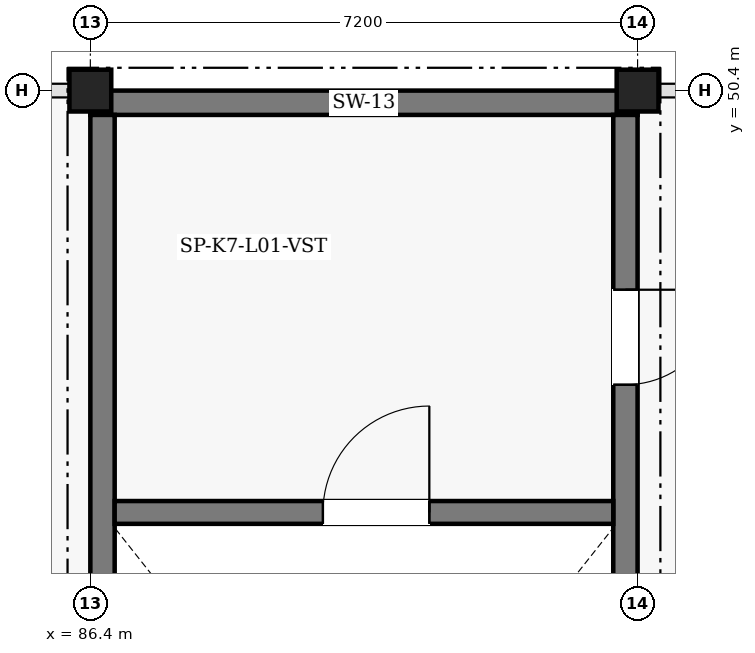
"""IFC4 building model, lengths in metres.
Left out: names, types, materials, properties, quantities, classifications, styles, units other than length and angle.
Written with IfcOpenShell. Run it as: python <this file> out.ifc"""

import sys

from ifc_helpers import new_model, si_unit, direction, frame, frame_2d, origin, origin_2d, place, context, subcontext, project, spatial, rectangle, extrude, element, fill, save


model = new_model("IFC4")
c1 = context("Model", 3, precision=1e-05, world=origin(), true_north=direction((0.0, 1.0)))
c2 = subcontext(c1, "Body", "Model", "MODEL_VIEW")
j1 = project(units=[si_unit("LENGTHUNIT", "METRE"), si_unit("PLANEANGLEUNIT", "RADIAN")], contexts=[c1])
p1 = place(None, origin())
s1 = spatial("IfcSite", under=j1, at=p1, CompositionType="ELEMENT")
p2 = place(p1, origin())
s2 = spatial("IfcBuilding", under=s1, at=p2, CompositionType="ELEMENT")
p3 = place(p2, frame((0.0, 0.0, 5.4)))
s3 = spatial("IfcBuildingStorey", under=s2, at=p3, CompositionType="ELEMENT", Elevation=5.4)
p4 = place(p3, frame((86.4, 50.24, 0.0), z_axis=(0.0, 0.0, 1.0), x_axis=(1.0, 0.0, 0.0)))
e1 = element("IfcWall", 1, at=p4, inside=s3, PredefinedType="SHEAR", context=c2, shape_type="SweptSolid", body=[
    extrude(rectangle(XDim=7.2, YDim=0.32, at=frame_2d((3.6, 0.0))), origin(), (0.0, 0.0, 1.0), 4.2),
])
p5 = place(p3, frame((93.44, 50.08, 0.0), z_axis=(0.0, 0.0, 1.0), x_axis=(0.0, -1.0, 0.0)))
e2 = element("IfcWall", 2, at=p5, inside=s3, PredefinedType="SHEAR", context=c2, shape_type="SweptSolid", body=[
    extrude(rectangle(XDim=13.76, YDim=0.32, at=frame_2d((6.88, 0.0))), origin(), (0.0, 0.0, 1.0), 4.2),
])
p6 = place(p5, frame((2.3, 0.0, 0.0)))
e3 = element("IfcOpeningElement", 3, at=p6, cuts=e2, PredefinedType="OPENING", context=c2, shape_type="SweptSolid", body=[
    extrude(rectangle(XDim=1.25, YDim=2.2, at=frame_2d((0.625, 1.1))), frame((0.0, 0.17, 0.0), z_axis=(0.0, -1.0, 0.0), x_axis=(1.0, 0.0, 0.0)), (0.0, 0.0, 1.0), 0.34),
])
p7 = place(p3, frame((86.56, 36.32, 0.0), z_axis=(0.0, 0.0, 1.0), x_axis=(0.0, 1.0, 0.0)))
e4 = element("IfcWall", 4, at=p7, inside=s3, PredefinedType="SHEAR", context=c2, shape_type="SweptSolid", body=[
    extrude(rectangle(XDim=13.76, YDim=0.32, at=frame_2d((6.88, 0.0))), origin(), (0.0, 0.0, 1.0), 4.2),
])
p8 = place(p3, frame((86.72, 44.85, 0.0), z_axis=(0.0, 0.0, 1.0), x_axis=(1.0, 0.0, 0.0)))
e5 = element("IfcWall", 5, at=p8, inside=s3, PredefinedType="SHEAR", context=c2, shape_type="SweptSolid", body=[
    extrude(rectangle(XDim=6.56, YDim=0.3, at=frame_2d((3.28, 0.0))), origin(), (0.0, 0.0, 1.0), 4.2),
])
p9 = place(p8, frame((2.74, 0.0, 0.0)))
e6 = element("IfcOpeningElement", 6, at=p9, cuts=e5, PredefinedType="OPENING", context=c2, shape_type="SweptSolid", body=[
    extrude(rectangle(XDim=1.4, YDim=2.2, at=frame_2d((0.7, 1.1))), frame((0.0, 0.16, 0.0), z_axis=(0.0, -1.0, 0.0), x_axis=(1.0, 0.0, 0.0)), (0.0, 0.0, 1.0), 0.32),
])
for number, where, z_axis, x_axis in (
    (7, (86.4, 50.4, 0.0), (0.0, 0.0, 1.0), (1.0, 0.0, 0.0)),
    (8, (93.6, 50.4, 0.0), (0.0, 0.0, 1.0), (1.0, 0.0, 0.0)),
):
    element("IfcColumn", number, at=place(p3, frame(where, z_axis=z_axis, x_axis=x_axis)), inside=s3, PredefinedType="COLUMN", context=c2, shape_type="SweptSolid", body=[
        extrude(rectangle(XDim=0.55, YDim=0.55, at=origin_2d()), origin(), (0.0, 0.0, 1.0), 3.6),
    ])
p10 = place(p9, origin())
e9 = element("IfcDoor", 9, at=p10, inside=s3, OperationType="SINGLE_SWING_RIGHT", PredefinedType="DOOR", context=c2, shape_type="SweptSolid", body=[
    extrude(rectangle(XDim=1.4, YDim=2.2, at=frame_2d((0.7, 1.1))), frame((0.0, 0.025, 0.0), z_axis=(0.0, -1.0, 0.0), x_axis=(1.0, 0.0, 0.0)), (0.0, 0.0, 1.0), 0.05),
])
fill(e6, e9)
p11 = place(p6, origin())
e10 = element("IfcDoor", 10, at=p11, inside=s3, OperationType="SINGLE_SWING_LEFT", PredefinedType="DOOR", context=c2, shape_type="SweptSolid", body=[
    extrude(rectangle(XDim=1.25, YDim=2.2, at=frame_2d((0.625, 1.1))), frame((0.0, 0.025, 0.0), z_axis=(0.0, -1.0, 0.0), x_axis=(1.0, 0.0, 0.0)), (0.0, 0.0, 1.0), 0.05),
])
fill(e3, e10)
save(model, sys.argv[1])
